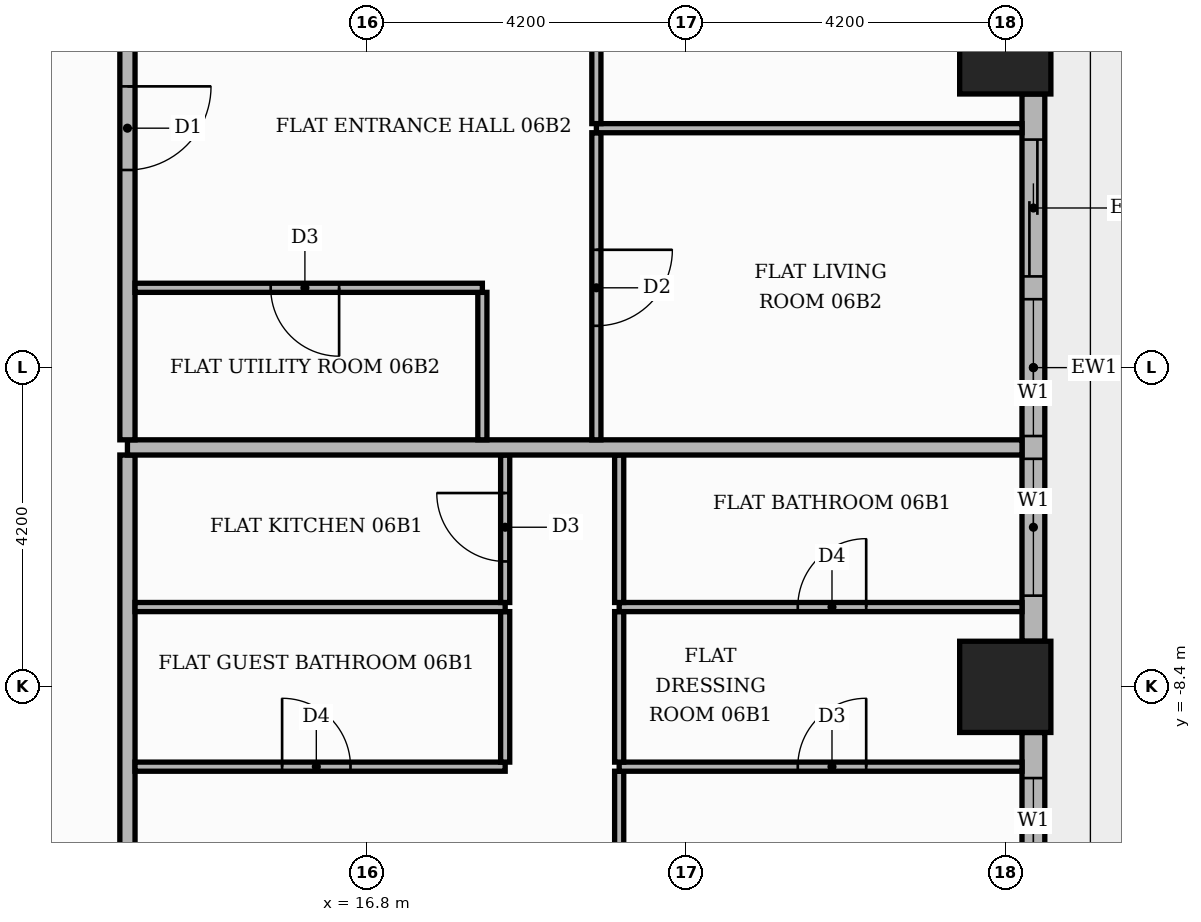
"""IFC4 building model, lengths in metres.
Left out: names, types, materials, properties, quantities, classifications, styles, units other than length and angle.
Written with IfcOpenShell. Run it as: python <this file> out.ifc"""

import sys

from ifc_helpers import new_model, si_unit, direction, frame, frame_2d, origin, origin_2d, place, context, subcontext, project, spatial, rectangle, extrude, element, fill, save


model = new_model("IFC4")
c1 = context("Model", 3, precision=1e-05, world=origin(), true_north=direction((0.0, 1.0)))
c2 = subcontext(c1, "Body", "Model", "MODEL_VIEW")
j1 = project(units=[si_unit("LENGTHUNIT", "METRE"), si_unit("PLANEANGLEUNIT", "RADIAN")], contexts=[c1])
p1 = place(None, origin())
s1 = spatial("IfcSite", under=j1, at=p1, CompositionType="ELEMENT")
p2 = place(p1, origin())
s2 = spatial("IfcBuilding", under=s1, at=p2, CompositionType="ELEMENT")
p3 = place(p2, frame((0.0, 0.0, 30.9)))
s3 = spatial("IfcBuildingStorey", under=s2, at=p3, CompositionType="ELEMENT", Elevation=30.9)
for number, where, z_axis, x_axis in (
    (1, (25.2, 0.0, 0.0), (0.0, 0.0, 1.0), (1.0, 0.0, 0.0)),
    (2, (25.2, -8.4, 0.0), (0.0, 0.0, 1.0), (1.0, 0.0, 0.0)),
):
    element("IfcColumn", number, at=place(p3, frame(where, z_axis=z_axis, x_axis=x_axis)), inside=s3, PredefinedType="COLUMN", context=c2, shape_type="SweptSolid", body=[
        extrude(rectangle(XDim=1.2, YDim=1.2, at=origin_2d()), origin(), (0.0, 0.0, 1.0), 3.9),
    ])
p4 = place(p3, frame((25.57, -16.2, 0.0), z_axis=(0.0, 0.0, 1.0), x_axis=(0.0, 1.0, 0.0)))
e3 = element("IfcWall", 3, at=p4, inside=s3, PredefinedType="STANDARD", context=c2, shape_type="SweptSolid", body=[
    extrude(rectangle(XDim=7.2, YDim=0.3, at=frame_2d((3.6, 0.0))), origin(), (0.0, 0.0, 1.0), 3.48),
])
p5 = place(p4, frame((0.6, 0.0, 0.0)))
e4 = element("IfcOpeningElement", 4, at=p5, cuts=e3, PredefinedType="OPENING", context=c2, shape_type="SweptSolid", body=[
    extrude(rectangle(XDim=1.8, YDim=2.4, at=frame_2d((0.9, 1.2))), frame((0.0, 0.16, 0.0), z_axis=(0.0, -1.0, 0.0), x_axis=(1.0, 0.0, 0.0)), (0.0, 0.0, 1.0), 0.32),
])
p6 = place(p4, frame((2.7, 0.0, 0.0)))
e5 = element("IfcOpeningElement", 5, at=p6, cuts=e3, PredefinedType="OPENING", context=c2, shape_type="SweptSolid", body=[
    extrude(rectangle(XDim=1.8, YDim=2.4, at=frame_2d((0.9, 1.2))), frame((0.0, 0.16, 0.0), z_axis=(0.0, -1.0, 0.0), x_axis=(1.0, 0.0, 0.0)), (0.0, 0.0, 1.0), 0.32),
])
p7 = place(p4, frame((4.8, 0.0, 0.9)))
e6 = element("IfcOpeningElement", 6, at=p7, cuts=e3, PredefinedType="OPENING", context=c2, shape_type="SweptSolid", body=[
    extrude(rectangle(XDim=1.8, YDim=2.1, at=frame_2d((0.9, 1.05))), frame((0.0, 0.16, 0.0), z_axis=(0.0, -1.0, 0.0), x_axis=(1.0, 0.0, 0.0)), (0.0, 0.0, 1.0), 0.32),
])
p8 = place(p3, frame((25.57, -7.8, 0.0), z_axis=(0.0, 0.0, 1.0), x_axis=(0.0, 1.0, 0.0)))
e7 = element("IfcWall", 7, at=p8, inside=s3, PredefinedType="STANDARD", context=c2, shape_type="SweptSolid", body=[
    extrude(rectangle(XDim=7.2, YDim=0.3, at=frame_2d((3.6, 0.0))), origin(), (0.0, 0.0, 1.0), 3.48),
])
p9 = place(p8, frame((0.6, 0.0, 0.9)))
e8 = element("IfcOpeningElement", 8, at=p9, cuts=e7, PredefinedType="OPENING", context=c2, shape_type="SweptSolid", body=[
    extrude(rectangle(XDim=1.8, YDim=2.1, at=frame_2d((0.9, 1.05))), frame((0.0, 0.16, 0.0), z_axis=(0.0, -1.0, 0.0), x_axis=(1.0, 0.0, 0.0)), (0.0, 0.0, 1.0), 0.32),
])
p10 = place(p8, frame((2.7, 0.0, 0.9)))
e9 = element("IfcOpeningElement", 9, at=p10, cuts=e7, PredefinedType="OPENING", context=c2, shape_type="SweptSolid", body=[
    extrude(rectangle(XDim=1.8, YDim=2.1, at=frame_2d((0.9, 1.05))), frame((0.0, 0.16, 0.0), z_axis=(0.0, -1.0, 0.0), x_axis=(1.0, 0.0, 0.0)), (0.0, 0.0, 1.0), 0.32),
])
p11 = place(p8, frame((4.8, 0.0, 0.0)))
e10 = element("IfcOpeningElement", 10, at=p11, cuts=e7, PredefinedType="OPENING", context=c2, shape_type="SweptSolid", body=[
    extrude(rectangle(XDim=1.8, YDim=2.4, at=frame_2d((0.9, 1.2))), frame((0.0, 0.16, 0.0), z_axis=(0.0, -1.0, 0.0), x_axis=(1.0, 0.0, 0.0)), (0.0, 0.0, 1.0), 0.32),
])
p12 = place(p3, frame((20.12, -13.59, 0.0), z_axis=(0.0, 0.0, 1.0), x_axis=(0.0, 1.0, 0.0)))
e11 = element("IfcWall", 11, at=p12, inside=s3, PredefinedType="PARTITIONING", context=c2, shape_type="SweptSolid", body=[
    extrude(rectangle(XDim=4.08, YDim=0.12, at=frame_2d((2.04, 0.0))), origin(), (0.0, 0.0, 1.0), 3.48),
])
p13 = place(p12, frame((1.59, 0.0, 0.0)))
e12 = element("IfcOpeningElement", 12, at=p13, cuts=e11, PredefinedType="OPENING", context=c2, shape_type="SweptSolid", body=[
    extrude(rectangle(XDim=0.9, YDim=2.1, at=frame_2d((0.45, 1.05))), frame((0.0, 0.07, 0.0), z_axis=(0.0, -1.0, 0.0), x_axis=(1.0, 0.0, 0.0)), (0.0, 0.0, 1.0), 0.14),
])
p14 = place(p3, frame((13.65, -13.55, 0.0), z_axis=(0.0, 0.0, 1.0), x_axis=(0.0, 1.0, 0.0)))
e13 = element("IfcWall", 13, at=p14, inside=s3, PredefinedType="PARTITIONING", context=c2, shape_type="SweptSolid", body=[
    extrude(rectangle(XDim=8.2, YDim=0.2, at=frame_2d((4.1, 0.0))), origin(), (0.0, 0.0, 1.0), 3.48),
])
p15 = place(p14, frame((1.45, 0.0, 0.0)))
e14 = element("IfcOpeningElement", 14, at=p15, cuts=e13, PredefinedType="OPENING", context=c2, shape_type="SweptSolid", body=[
    extrude(rectangle(XDim=1.1, YDim=2.4, at=frame_2d((0.55, 1.2))), frame((0.0, 0.11, 0.0), z_axis=(0.0, -1.0, 0.0), x_axis=(1.0, 0.0, 0.0)), (0.0, 0.0, 1.0), 0.22),
])
p16 = place(p3, frame((13.75, -9.45, 0.0), z_axis=(0.0, 0.0, 1.0), x_axis=(1.0, 0.0, 0.0)))
e15 = element("IfcWall", 15, at=p16, inside=s3, PredefinedType="PARTITIONING", context=c2, shape_type="SweptSolid", body=[
    extrude(rectangle(XDim=4.87, YDim=0.12, at=frame_2d((2.435, 0.0))), origin(), (0.0, 0.0, 1.0), 3.48),
])
p17 = place(p16, frame((1.935, 0.0, 0.0)))
e16 = element("IfcOpeningElement", 16, at=p17, cuts=e15, PredefinedType="OPENING", context=c2, shape_type="SweptSolid", body=[
    extrude(rectangle(XDim=0.9, YDim=2.1, at=frame_2d((0.45, 1.05))), frame((0.0, 0.07, 0.0), z_axis=(0.0, -1.0, 0.0), x_axis=(1.0, 0.0, 0.0)), (0.0, 0.0, 1.0), 0.14),
])
p18 = place(p3, frame((20.12, -9.45, 0.0), z_axis=(0.0, 0.0, 1.0), x_axis=(1.0, 0.0, 0.0)))
e17 = element("IfcWall", 17, at=p18, inside=s3, PredefinedType="PARTITIONING", context=c2, shape_type="SweptSolid", body=[
    extrude(rectangle(XDim=5.3, YDim=0.12, at=frame_2d((2.65, 0.0))), origin(), (0.0, 0.0, 1.0), 3.48),
])
p19 = place(p18, frame((2.35, 0.0, 0.0)))
e18 = element("IfcOpeningElement", 18, at=p19, cuts=e17, PredefinedType="OPENING", context=c2, shape_type="SweptSolid", body=[
    extrude(rectangle(XDim=0.9, YDim=2.1, at=frame_2d((0.45, 1.05))), frame((0.0, 0.07, 0.0), z_axis=(0.0, -1.0, 0.0), x_axis=(1.0, 0.0, 0.0)), (0.0, 0.0, 1.0), 0.14),
])
for number, where, z_axis, x_axis in (
    (19, (18.62, -9.39, 0.0), (0.0, 0.0, 1.0), (0.0, 1.0, 0.0)),
    (20, (20.12, -9.39, 0.0), (0.0, 0.0, 1.0), (0.0, 1.0, 0.0)),
):
    element("IfcWall", number, at=place(p3, frame(where, z_axis=z_axis, x_axis=x_axis)), inside=s3, PredefinedType="PARTITIONING", context=c2, shape_type="SweptSolid", body=[
        extrude(rectangle(XDim=1.98, YDim=0.12, at=frame_2d((0.99, 0.0))), origin(), (0.0, 0.0, 1.0), 3.48),
    ])
p20 = place(p3, frame((13.75, -7.35, 0.0), z_axis=(0.0, 0.0, 1.0), x_axis=(1.0, 0.0, 0.0)))
e21 = element("IfcWall", 21, at=p20, inside=s3, PredefinedType="PARTITIONING", context=c2, shape_type="SweptSolid", body=[
    extrude(rectangle(XDim=4.87, YDim=0.12, at=frame_2d((2.435, 0.0))), origin(), (0.0, 0.0, 1.0), 3.48),
])
p21 = place(p3, frame((20.12, -7.35, 0.0), z_axis=(0.0, 0.0, 1.0), x_axis=(1.0, 0.0, 0.0)))
e22 = element("IfcWall", 22, at=p21, inside=s3, PredefinedType="PARTITIONING", context=c2, shape_type="SweptSolid", body=[
    extrude(rectangle(XDim=5.3, YDim=0.12, at=frame_2d((2.65, 0.0))), origin(), (0.0, 0.0, 1.0), 3.48),
])
p22 = place(p21, frame((2.35, 0.0, 0.0)))
e23 = element("IfcOpeningElement", 23, at=p22, cuts=e22, PredefinedType="OPENING", context=c2, shape_type="SweptSolid", body=[
    extrude(rectangle(XDim=0.9, YDim=2.1, at=frame_2d((0.45, 1.05))), frame((0.0, 0.07, 0.0), z_axis=(0.0, -1.0, 0.0), x_axis=(1.0, 0.0, 0.0)), (0.0, 0.0, 1.0), 0.14),
])
p23 = place(p3, frame((18.62, -7.29, 0.0), z_axis=(0.0, 0.0, 1.0), x_axis=(0.0, 1.0, 0.0)))
e24 = element("IfcWall", 24, at=p23, inside=s3, PredefinedType="PARTITIONING", context=c2, shape_type="SweptSolid", body=[
    extrude(rectangle(XDim=1.94, YDim=0.12, at=frame_2d((0.97, 0.0))), origin(), (0.0, 0.0, 1.0), 3.48),
])
p24 = place(p23, frame((0.54, 0.0, 0.0)))
e25 = element("IfcOpeningElement", 25, at=p24, cuts=e24, PredefinedType="OPENING", context=c2, shape_type="SweptSolid", body=[
    extrude(rectangle(XDim=0.9, YDim=2.1, at=frame_2d((0.45, 1.05))), frame((0.0, 0.07, 0.0), z_axis=(0.0, -1.0, 0.0), x_axis=(1.0, 0.0, 0.0)), (0.0, 0.0, 1.0), 0.14),
])
p25 = place(p3, frame((20.12, -7.29, 0.0), z_axis=(0.0, 0.0, 1.0), x_axis=(0.0, 1.0, 0.0)))
e26 = element("IfcWall", 26, at=p25, inside=s3, PredefinedType="PARTITIONING", context=c2, shape_type="SweptSolid", body=[
    extrude(rectangle(XDim=1.94, YDim=0.12, at=frame_2d((0.97, 0.0))), origin(), (0.0, 0.0, 1.0), 3.48),
])
p26 = place(p3, frame((13.65, -5.25, 0.0), z_axis=(0.0, 0.0, 1.0), x_axis=(1.0, 0.0, 0.0)))
e27 = element("IfcWall", 27, at=p26, inside=s3, PredefinedType="PARTITIONING", context=c2, shape_type="SweptSolid", body=[
    extrude(rectangle(XDim=11.77, YDim=0.2, at=frame_2d((5.885, 0.0))), origin(), (0.0, 0.0, 1.0), 3.48),
])
p27 = place(p3, frame((13.65, -5.15, 0.0), z_axis=(0.0, 0.0, 1.0), x_axis=(0.0, 1.0, 0.0)))
e28 = element("IfcWall", 28, at=p27, inside=s3, PredefinedType="PARTITIONING", context=c2, shape_type="SweptSolid", body=[
    extrude(rectangle(XDim=18.7, YDim=0.2, at=frame_2d((9.35, 0.0))), origin(), (0.0, 0.0, 1.0), 3.48),
])
p28 = place(p27, frame((3.55, 0.0, 0.0)))
e29 = element("IfcOpeningElement", 29, at=p28, cuts=e28, PredefinedType="OPENING", context=c2, shape_type="SweptSolid", body=[
    extrude(rectangle(XDim=1.1, YDim=2.4, at=frame_2d((0.55, 1.2))), frame((0.0, 0.11, 0.0), z_axis=(0.0, -1.0, 0.0), x_axis=(1.0, 0.0, 0.0)), (0.0, 0.0, 1.0), 0.22),
])
p29 = place(p3, frame((18.32, -5.15, 0.0), z_axis=(0.0, 0.0, 1.0), x_axis=(0.0, 1.0, 0.0)))
e30 = element("IfcWall", 30, at=p29, inside=s3, PredefinedType="PARTITIONING", context=c2, shape_type="SweptSolid", body=[
    extrude(rectangle(XDim=1.94, YDim=0.12, at=frame_2d((0.97, 0.0))), origin(), (0.0, 0.0, 1.0), 3.48),
])
p30 = place(p3, frame((19.82, -5.15, 0.0), z_axis=(0.0, 0.0, 1.0), x_axis=(0.0, 1.0, 0.0)))
e31 = element("IfcWall", 31, at=p30, inside=s3, PredefinedType="PARTITIONING", context=c2, shape_type="SweptSolid", body=[
    extrude(rectangle(XDim=4.04, YDim=0.12, at=frame_2d((2.02, 0.0))), origin(), (0.0, 0.0, 1.0), 3.48),
])
p31 = place(p30, frame((1.5, 0.0, 0.0)))
e32 = element("IfcOpeningElement", 32, at=p31, cuts=e31, PredefinedType="OPENING", context=c2, shape_type="SweptSolid", body=[
    extrude(rectangle(XDim=1.0, YDim=2.1, at=frame_2d((0.5, 1.05))), frame((0.0, 0.07, 0.0), z_axis=(0.0, -1.0, 0.0), x_axis=(1.0, 0.0, 0.0)), (0.0, 0.0, 1.0), 0.14),
])
p32 = place(p3, frame((13.75, -3.15, 0.0), z_axis=(0.0, 0.0, 1.0), x_axis=(1.0, 0.0, 0.0)))
e33 = element("IfcWall", 33, at=p32, inside=s3, PredefinedType="PARTITIONING", context=c2, shape_type="SweptSolid", body=[
    extrude(rectangle(XDim=4.57, YDim=0.12, at=frame_2d((2.285, 0.0))), origin(), (0.0, 0.0, 1.0), 3.48),
])
p33 = place(p32, frame((1.785, 0.0, 0.0)))
e34 = element("IfcOpeningElement", 34, at=p33, cuts=e33, PredefinedType="OPENING", context=c2, shape_type="SweptSolid", body=[
    extrude(rectangle(XDim=0.9, YDim=2.1, at=frame_2d((0.45, 1.05))), frame((0.0, 0.07, 0.0), z_axis=(0.0, -1.0, 0.0), x_axis=(1.0, 0.0, 0.0)), (0.0, 0.0, 1.0), 0.14),
])
p34 = place(p3, frame((19.82, -1.05, 0.0), z_axis=(0.0, 0.0, 1.0), x_axis=(1.0, 0.0, 0.0)))
e35 = element("IfcWall", 35, at=p34, inside=s3, PredefinedType="PARTITIONING", context=c2, shape_type="SweptSolid", body=[
    extrude(rectangle(XDim=5.6, YDim=0.12, at=frame_2d((2.8, 0.0))), origin(), (0.0, 0.0, 1.0), 3.48),
])
p35 = place(p3, frame((19.82, -0.99, 0.0), z_axis=(0.0, 0.0, 1.0), x_axis=(0.0, 1.0, 0.0)))
e36 = element("IfcWall", 36, at=p35, inside=s3, PredefinedType="PARTITIONING", context=c2, shape_type="SweptSolid", body=[
    extrude(rectangle(XDim=4.08, YDim=0.12, at=frame_2d((2.04, 0.0))), origin(), (0.0, 0.0, 1.0), 3.48),
])
p36 = place(p35, frame((1.59, 0.0, 0.0)))
e37 = element("IfcOpeningElement", 37, at=p36, cuts=e36, PredefinedType="OPENING", context=c2, shape_type="SweptSolid", body=[
    extrude(rectangle(XDim=0.9, YDim=2.1, at=frame_2d((0.45, 1.05))), frame((0.0, 0.07, 0.0), z_axis=(0.0, -1.0, 0.0), x_axis=(1.0, 0.0, 0.0)), (0.0, 0.0, 1.0), 0.14),
])
p37 = place(p7, origin())
e38 = element("IfcWindow", 38, at=p37, inside=s3, PartitioningType="SINGLE_PANEL", PredefinedType="WINDOW", context=c2, shape_type="SweptSolid", body=[
    extrude(rectangle(XDim=1.8, YDim=2.1, at=frame_2d((0.9, 1.05))), frame((0.0, 0.03, 0.0), z_axis=(0.0, -1.0, 0.0), x_axis=(1.0, 0.0, 0.0)), (0.0, 0.0, 1.0), 0.06),
])
fill(e6, e38)
p38 = place(p9, origin())
e39 = element("IfcWindow", 39, at=p38, inside=s3, PartitioningType="SINGLE_PANEL", PredefinedType="WINDOW", context=c2, shape_type="SweptSolid", body=[
    extrude(rectangle(XDim=1.8, YDim=2.1, at=frame_2d((0.9, 1.05))), frame((0.0, 0.03, 0.0), z_axis=(0.0, -1.0, 0.0), x_axis=(1.0, 0.0, 0.0)), (0.0, 0.0, 1.0), 0.06),
])
fill(e8, e39)
p39 = place(p10, origin())
e40 = element("IfcWindow", 40, at=p39, inside=s3, PartitioningType="SINGLE_PANEL", PredefinedType="WINDOW", context=c2, shape_type="SweptSolid", body=[
    extrude(rectangle(XDim=1.8, YDim=2.1, at=frame_2d((0.9, 1.05))), frame((0.0, 0.03, 0.0), z_axis=(0.0, -1.0, 0.0), x_axis=(1.0, 0.0, 0.0)), (0.0, 0.0, 1.0), 0.06),
])
fill(e9, e40)
p40 = place(p11, origin())
e41 = element("IfcDoor", 41, at=p40, inside=s3, OperationType="SLIDING_TO_RIGHT", PredefinedType="DOOR", context=c2, shape_type="SweptSolid", body=[
    extrude(rectangle(XDim=1.8, YDim=2.4, at=frame_2d((0.9, 1.2))), frame((0.0, 0.025, 0.0), z_axis=(0.0, -1.0, 0.0), x_axis=(1.0, 0.0, 0.0)), (0.0, 0.0, 1.0), 0.05),
])
fill(e10, e41)
p41 = place(p17, origin())
e42 = element("IfcDoor", 42, at=p41, inside=s3, OperationType="SINGLE_SWING_LEFT", PredefinedType="DOOR", context=c2, shape_type="SweptSolid", body=[
    extrude(rectangle(XDim=0.9, YDim=2.1, at=frame_2d((0.45, 1.05))), frame((0.0, 0.025, 0.0), z_axis=(0.0, -1.0, 0.0), x_axis=(1.0, 0.0, 0.0)), (0.0, 0.0, 1.0), 0.05),
])
fill(e16, e42)
p42 = place(p24, origin())
e43 = element("IfcDoor", 43, at=p42, inside=s3, OperationType="SINGLE_SWING_RIGHT", PredefinedType="DOOR", context=c2, shape_type="SweptSolid", body=[
    extrude(rectangle(XDim=0.9, YDim=2.1, at=frame_2d((0.45, 1.05))), frame((0.0, 0.025, 0.0), z_axis=(0.0, -1.0, 0.0), x_axis=(1.0, 0.0, 0.0)), (0.0, 0.0, 1.0), 0.05),
])
fill(e25, e43)
p43 = place(p19, origin())
e44 = element("IfcDoor", 44, at=p43, inside=s3, OperationType="SINGLE_SWING_RIGHT", PredefinedType="DOOR", context=c2, shape_type="SweptSolid", body=[
    extrude(rectangle(XDim=0.9, YDim=2.1, at=frame_2d((0.45, 1.05))), frame((0.0, 0.025, 0.0), z_axis=(0.0, -1.0, 0.0), x_axis=(1.0, 0.0, 0.0)), (0.0, 0.0, 1.0), 0.05),
])
fill(e18, e44)
p44 = place(p22, origin())
e45 = element("IfcDoor", 45, at=p44, inside=s3, OperationType="SINGLE_SWING_RIGHT", PredefinedType="DOOR", context=c2, shape_type="SweptSolid", body=[
    extrude(rectangle(XDim=0.9, YDim=2.1, at=frame_2d((0.45, 1.05))), frame((0.0, 0.025, 0.0), z_axis=(0.0, -1.0, 0.0), x_axis=(1.0, 0.0, 0.0)), (0.0, 0.0, 1.0), 0.05),
])
fill(e23, e45)
p45 = place(p28, frame((1.1, 0.0, 0.0), z_axis=(0.0, 0.0, 1.0), x_axis=(-1.0, 0.0, 0.0)))
e46 = element("IfcDoor", 46, at=p45, inside=s3, OperationType="SINGLE_SWING_RIGHT", PredefinedType="DOOR", context=c2, shape_type="SweptSolid", body=[
    extrude(rectangle(XDim=1.1, YDim=2.4, at=frame_2d((0.55, 1.2))), frame((0.0, 0.025, 0.0), z_axis=(0.0, -1.0, 0.0), x_axis=(1.0, 0.0, 0.0)), (0.0, 0.0, 1.0), 0.05),
])
fill(e29, e46)
p46 = place(p33, frame((0.9, 0.0, 0.0), z_axis=(0.0, 0.0, 1.0), x_axis=(-1.0, 0.0, 0.0)))
e47 = element("IfcDoor", 47, at=p46, inside=s3, OperationType="SINGLE_SWING_RIGHT", PredefinedType="DOOR", context=c2, shape_type="SweptSolid", body=[
    extrude(rectangle(XDim=0.9, YDim=2.1, at=frame_2d((0.45, 1.05))), frame((0.0, 0.025, 0.0), z_axis=(0.0, -1.0, 0.0), x_axis=(1.0, 0.0, 0.0)), (0.0, 0.0, 1.0), 0.05),
])
fill(e34, e47)
p47 = place(p31, frame((1.0, 0.0, 0.0), z_axis=(0.0, 0.0, 1.0), x_axis=(-1.0, 0.0, 0.0)))
e48 = element("IfcDoor", 48, at=p47, inside=s3, OperationType="SINGLE_SWING_RIGHT", PredefinedType="DOOR", context=c2, shape_type="SweptSolid", body=[
    extrude(rectangle(XDim=1.0, YDim=2.1, at=frame_2d((0.5, 1.05))), frame((0.0, 0.025, 0.0), z_axis=(0.0, -1.0, 0.0), x_axis=(1.0, 0.0, 0.0)), (0.0, 0.0, 1.0), 0.05),
])
fill(e32, e48)
save(model, sys.argv[1])
